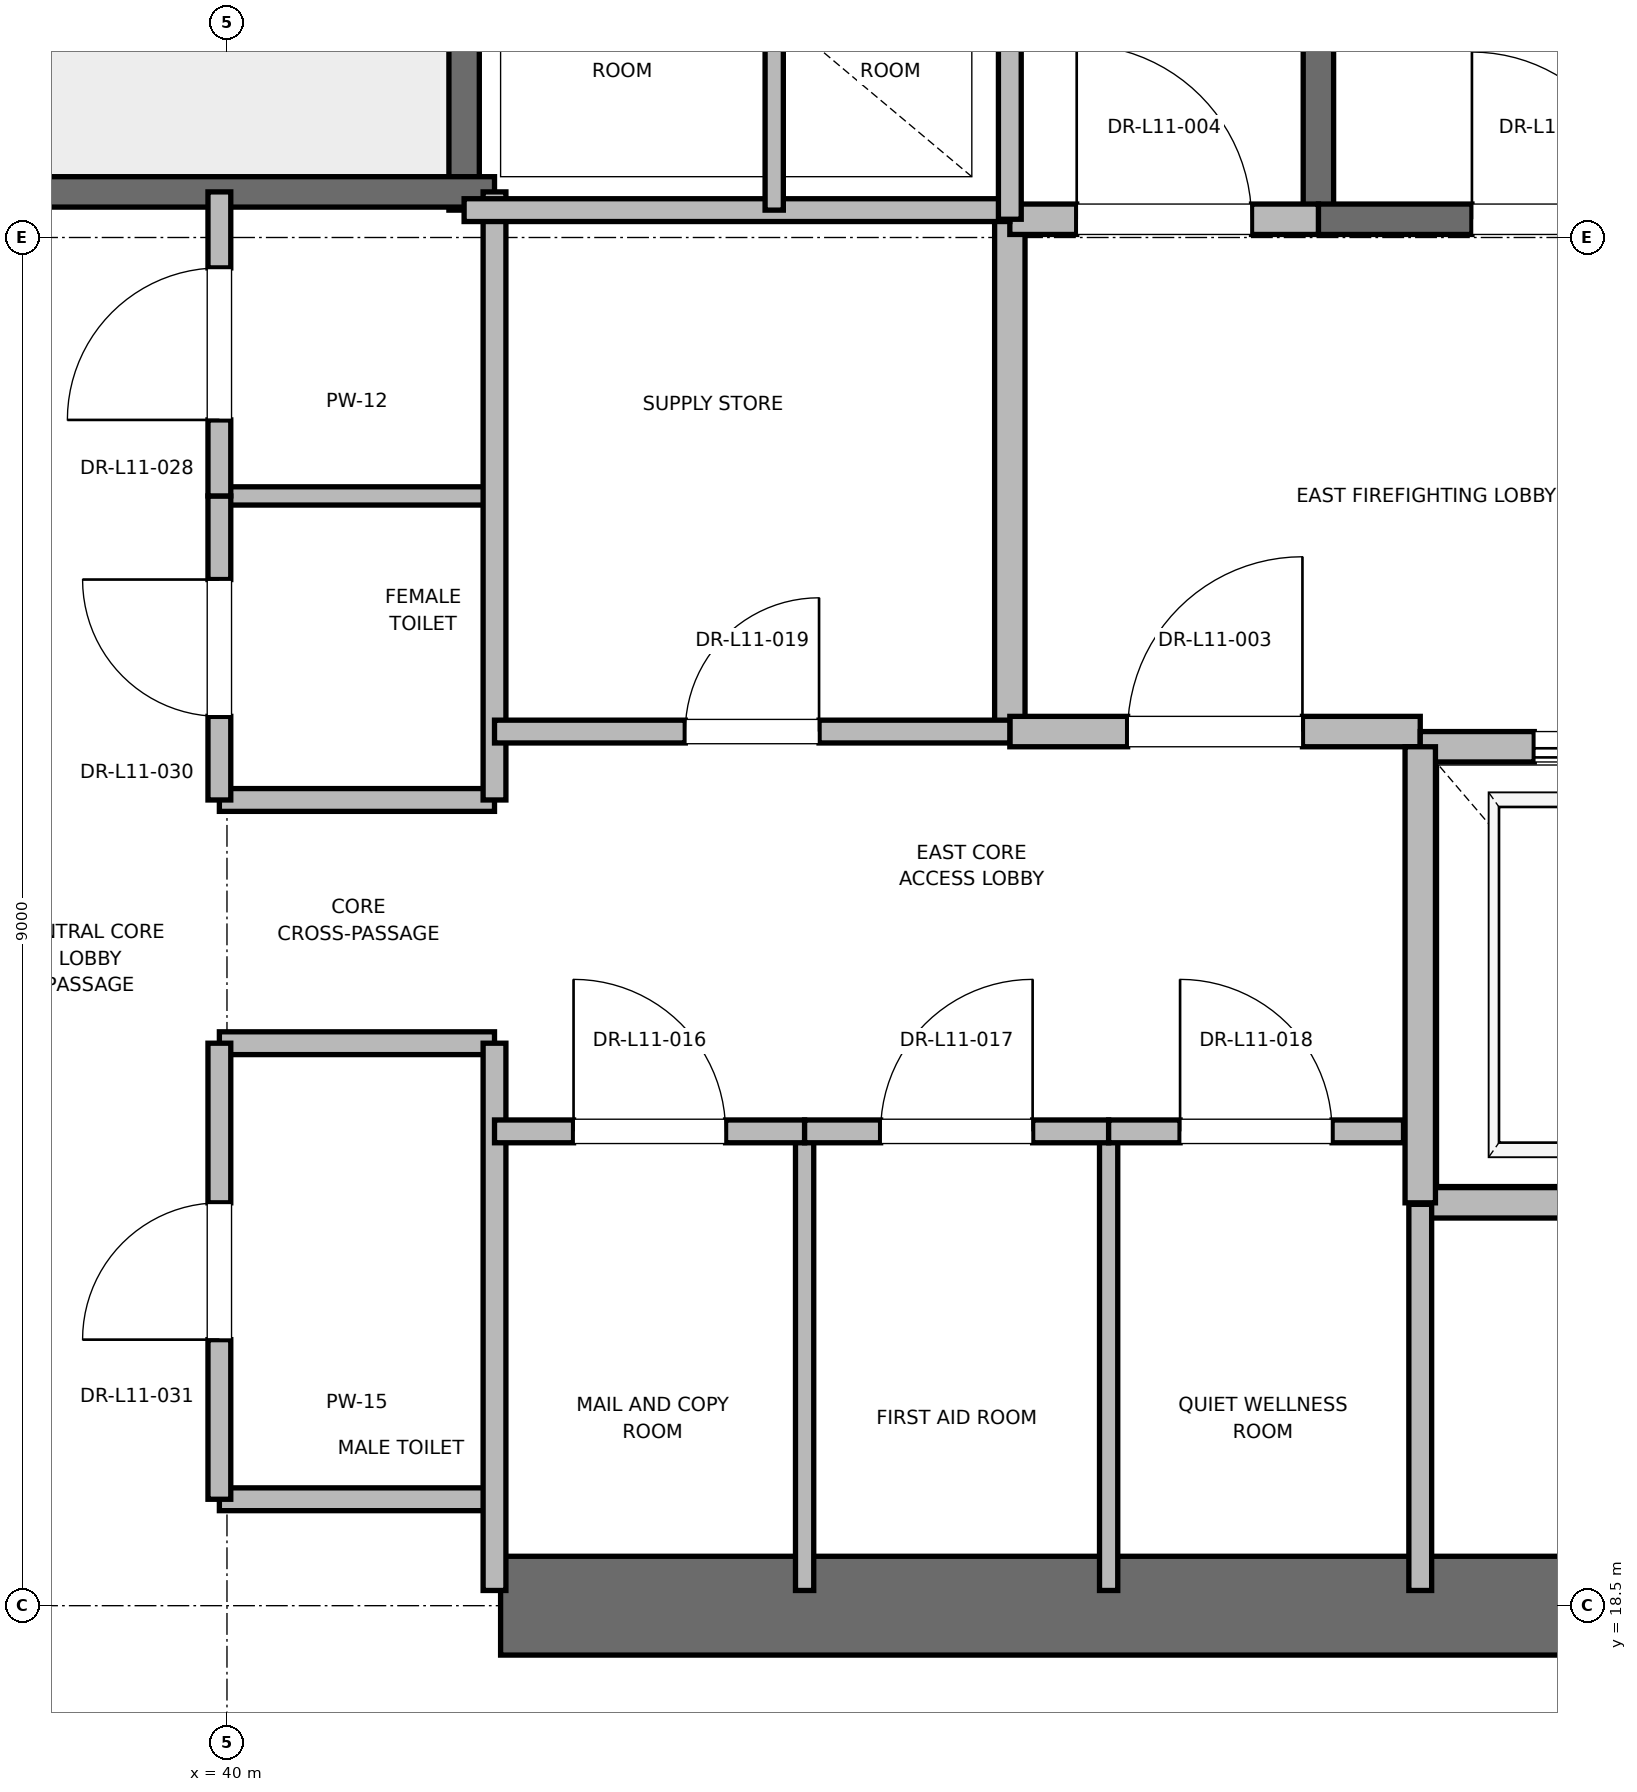
"""IFC4 building model, lengths in metres.
Left out: names, types, materials, properties, quantities, classifications, styles, units other than length and angle.
Written with IfcOpenShell. Run it as: python <this file> out.ifc"""

import sys

from ifc_helpers import new_model, si_unit, direction, frame, frame_2d, origin, place, context, subcontext, project, spatial, rectangle, extrude, element, fill, save


model = new_model("IFC4")
c1 = context("Model", 3, precision=1e-05, world=origin(), true_north=direction((0.0, 1.0)))
c2 = subcontext(c1, "Body", "Model", "MODEL_VIEW")
j1 = project(units=[si_unit("LENGTHUNIT", "METRE"), si_unit("PLANEANGLEUNIT", "RADIAN")], contexts=[c1])
p1 = place(None, origin())
s1 = spatial("IfcSite", under=j1, at=p1, CompositionType="ELEMENT")
p2 = place(p1, origin())
s2 = spatial("IfcBuilding", under=s1, at=p2, CompositionType="ELEMENT")
p3 = place(p2, frame((0.0, 0.0, 51.6)))
s3 = spatial("IfcBuildingStorey", under=s2, at=p3, CompositionType="ELEMENT", Elevation=51.6)
p4 = place(p3, frame((41.8, 18.5, 0.0), z_axis=(0.0, 0.0, 1.0), x_axis=(1.0, 0.0, 0.0)))
e1 = element("IfcWall", 1, at=p4, inside=s3, PredefinedType="SHEAR", context=c2, shape_type="SweptSolid", body=[
    extrude(rectangle(XDim=9.2, YDim=0.65, at=frame_2d((4.6, 0.0))), origin(), (0.0, 0.0, 1.0), 3.76),
])
p5 = place(p3, frame((47.18, 27.62, 0.0), z_axis=(0.0, 0.0, 1.0), x_axis=(0.0, 1.0, 0.0)))
e2 = element("IfcWall", 2, at=p5, inside=s3, PredefinedType="SOLIDWALL", context=c2, shape_type="SweptSolid", body=[
    extrude(rectangle(XDim=8.18, YDim=0.2, at=frame_2d((4.09, 0.0))), origin(), (0.0, 0.0, 1.0), 3.76),
])
p6 = place(p3, frame((47.18, 27.62, 0.0), z_axis=(0.0, 0.0, 1.0), x_axis=(1.0, 0.0, 0.0)))
e3 = element("IfcWall", 3, at=p6, inside=s3, PredefinedType="SOLIDWALL", context=c2, shape_type="SweptSolid", body=[
    extrude(rectangle(XDim=3.12, YDim=0.2, at=frame_2d((1.56, 0.0))), origin(), (0.0, 0.0, 1.0), 3.76),
])
p7 = place(p6, frame((1.01, 0.0, 0.0)))
e4 = element("IfcOpeningElement", 4, at=p7, cuts=e3, PredefinedType="OPENING", context=c2, shape_type="SweptSolid", body=[
    extrude(rectangle(XDim=1.1, YDim=2.15, at=frame_2d((0.55, 1.075))), frame((0.0, 0.1, 0.0), z_axis=(0.0, -1.0, 0.0), x_axis=(1.0, 0.0, 0.0)), (0.0, 0.0, 1.0), 0.2),
])
p8 = place(p3, frame((41.56, 27.68, 0.0), z_axis=(0.0, 0.0, 1.0), x_axis=(0.0, 1.0, 0.0)))
e5 = element("IfcWall", 5, at=p8, inside=s3, PredefinedType="SOLIDWALL", context=c2, shape_type="SweptSolid", body=[
    extrude(rectangle(XDim=8.57, YDim=0.2, at=frame_2d((4.285, 0.0))), origin(), (0.0, 0.0, 1.0), 3.76),
])
p9 = place(p3, frame((38.44, 27.8, 0.0), z_axis=(0.0, 0.0, 1.0), x_axis=(1.0, 0.0, 0.0)))
e6 = element("IfcWall", 6, at=p9, inside=s3, PredefinedType="SOLIDWALL", context=c2, shape_type="SweptSolid", body=[
    extrude(rectangle(XDim=3.32, YDim=0.2, at=frame_2d((1.66, 0.0))), origin(), (0.0, 0.0, 1.0), 3.76),
])
p10 = place(p3, frame((45.15, 24.25, 0.0), z_axis=(0.0, 0.0, 1.0), x_axis=(0.0, 1.0, 0.0)))
e7 = element("IfcWall", 7, at=p10, inside=s3, PredefinedType="PARTITIONING", context=c2, shape_type="SweptSolid", body=[
    extrude(rectangle(XDim=3.37, YDim=0.2, at=frame_2d((1.685, 0.0))), origin(), (0.0, 0.0, 1.0), 3.76),
])
p11 = place(p3, frame((45.15, 24.25, 0.0), z_axis=(0.0, 0.0, 1.0), x_axis=(1.0, 0.0, 0.0)))
e8 = element("IfcWall", 8, at=p11, inside=s3, PredefinedType="PARTITIONING", context=c2, shape_type="SweptSolid", body=[
    extrude(rectangle(XDim=2.7, YDim=0.2, at=frame_2d((1.35, 0.0))), origin(), (0.0, 0.0, 1.0), 3.76),
])
p12 = place(p11, frame((0.775, 0.0, 0.0)))
e9 = element("IfcOpeningElement", 9, at=p12, cuts=e8, PredefinedType="OPENING", context=c2, shape_type="SweptSolid", body=[
    extrude(rectangle(XDim=1.15, YDim=2.2, at=frame_2d((0.575, 1.1))), frame((0.0, 0.1, 0.0), z_axis=(0.0, -1.0, 0.0), x_axis=(1.0, 0.0, 0.0)), (0.0, 0.0, 1.0), 0.2),
])
p13 = place(p3, frame((45.15, 27.62, 0.0), z_axis=(0.0, 0.0, 1.0), x_axis=(1.0, 0.0, 0.0)))
e10 = element("IfcWall", 10, at=p13, inside=s3, PredefinedType="PARTITIONING", context=c2, shape_type="SweptSolid", body=[
    extrude(rectangle(XDim=2.03, YDim=0.2, at=frame_2d((1.015, 0.0))), origin(), (0.0, 0.0, 1.0), 3.76),
])
p14 = place(p13, frame((0.44, 0.0, 0.0)))
e11 = element("IfcOpeningElement", 11, at=p14, cuts=e10, PredefinedType="OPENING", context=c2, shape_type="SweptSolid", body=[
    extrude(rectangle(XDim=1.15, YDim=2.2, at=frame_2d((0.575, 1.1))), frame((0.0, 0.1, 0.0), z_axis=(0.0, -1.0, 0.0), x_axis=(1.0, 0.0, 0.0)), (0.0, 0.0, 1.0), 0.2),
])
p15 = place(p3, frame((47.85, 21.15, 0.0), z_axis=(0.0, 0.0, 1.0), x_axis=(1.0, 0.0, 0.0)))
e12 = element("IfcWall", 12, at=p15, inside=s3, PredefinedType="SOLIDWALL", context=c2, shape_type="SweptSolid", body=[
    extrude(rectangle(XDim=2.6, YDim=0.2, at=frame_2d((1.3, 0.0))), origin(), (0.0, 0.0, 1.0), 3.76),
])
p16 = place(p3, frame((50.45, 24.15, 0.0), z_axis=(0.0, 0.0, 1.0), x_axis=(-1.0, 0.0, 0.0)))
e13 = element("IfcWall", 13, at=p16, inside=s3, PredefinedType="SOLIDWALL", context=c2, shape_type="SweptSolid", body=[
    extrude(rectangle(XDim=2.6, YDim=0.2, at=frame_2d((1.3, 0.0))), origin(), (0.0, 0.0, 1.0), 2.54),
])
p17 = place(p16, frame((0.75, 0.0, 0.0)))
e14 = element("IfcOpeningElement", 14, at=p17, cuts=e13, PredefinedType="OPENING", context=c2, shape_type="SweptSolid", body=[
    extrude(rectangle(XDim=1.1, YDim=2.2, at=frame_2d((0.55, 1.1))), frame((0.0, 0.1, 0.0), z_axis=(0.0, -1.0, 0.0), x_axis=(1.0, 0.0, 0.0)), (0.0, 0.0, 1.0), 0.2),
])
p18 = place(p3, frame((47.85, 24.15, 0.0), z_axis=(0.0, 0.0, 1.0), x_axis=(0.0, -1.0, 0.0)))
e15 = element("IfcWall", 15, at=p18, inside=s3, PredefinedType="SOLIDWALL", context=c2, shape_type="SweptSolid", body=[
    extrude(rectangle(XDim=3.0, YDim=0.2, at=frame_2d((1.5, 0.0))), origin(), (0.0, 0.0, 1.0), 3.76),
])
for number, where, z_axis, x_axis in (
    (16, (39.95, 19.2, 0.0), (0.0, 0.0, 1.0), (1.0, 0.0, 0.0)),
    (17, (39.95, 22.2, 0.0), (0.0, 0.0, 1.0), (1.0, 0.0, 0.0)),
    (18, (39.95, 23.8, 0.0), (0.0, 0.0, 1.0), (1.0, 0.0, 0.0)),
):
    element("IfcWall", number, at=place(p3, frame(where, z_axis=z_axis, x_axis=x_axis)), inside=s3, PredefinedType="PARTITIONING", context=c2, shape_type="SweptSolid", body=[
        extrude(rectangle(XDim=1.81, YDim=0.15, at=frame_2d((0.905, 0.0))), origin(), (0.0, 0.0, 1.0), 2.85),
    ])
p19 = place(p3, frame((39.95, 25.8, 0.0), z_axis=(0.0, 0.0, 1.0), x_axis=(1.0, 0.0, 0.0)))
e19 = element("IfcWall", 19, at=p19, inside=s3, PredefinedType="PARTITIONING", context=c2, shape_type="SweptSolid", body=[
    extrude(rectangle(XDim=1.81, YDim=0.12, at=frame_2d((0.905, 0.0))), origin(), (0.0, 0.0, 1.0), 2.85),
])
p20 = place(p3, frame((41.76, 18.6, 0.0), z_axis=(0.0, 0.0, 1.0), x_axis=(0.0, 1.0, 0.0)))
e20 = element("IfcWall", 20, at=p20, inside=s3, PredefinedType="PARTITIONING", context=c2, shape_type="SweptSolid", body=[
    extrude(rectangle(XDim=3.6, YDim=0.15, at=frame_2d((1.8, 0.0))), origin(), (0.0, 0.0, 1.0), 2.54),
])
p21 = place(p3, frame((41.76, 23.8, 0.0), z_axis=(0.0, 0.0, 1.0), x_axis=(0.0, 1.0, 0.0)))
e21 = element("IfcWall", 21, at=p21, inside=s3, PredefinedType="PARTITIONING", context=c2, shape_type="SweptSolid", body=[
    extrude(rectangle(XDim=4.0, YDim=0.15, at=frame_2d((2.0, 0.0))), origin(), (0.0, 0.0, 1.0), 2.85),
])
p22 = place(p3, frame((39.95, 19.2, 0.0), z_axis=(0.0, 0.0, 1.0), x_axis=(0.0, 1.0, 0.0)))
e22 = element("IfcWall", 22, at=p22, inside=s3, PredefinedType="PARTITIONING", context=c2, shape_type="SweptSolid", body=[
    extrude(rectangle(XDim=3.0, YDim=0.15, at=frame_2d((1.5, 0.0))), origin(), (0.0, 0.0, 1.0), 2.85),
])
p23 = place(p22, frame((1.05, 0.0, 0.0)))
e23 = element("IfcOpeningElement", 23, at=p23, cuts=e22, PredefinedType="OPENING", context=c2, shape_type="SweptSolid", body=[
    extrude(rectangle(XDim=0.9, YDim=2.1, at=frame_2d((0.45, 1.05))), frame((0.0, 0.075, 0.0), z_axis=(0.0, -1.0, 0.0), x_axis=(1.0, 0.0, 0.0)), (0.0, 0.0, 1.0), 0.15),
])
p24 = place(p3, frame((39.95, 23.8, 0.0), z_axis=(0.0, 0.0, 1.0), x_axis=(0.0, 1.0, 0.0)))
e24 = element("IfcWall", 24, at=p24, inside=s3, PredefinedType="PARTITIONING", context=c2, shape_type="SweptSolid", body=[
    extrude(rectangle(XDim=2.0, YDim=0.15, at=frame_2d((1.0, 0.0))), origin(), (0.0, 0.0, 1.0), 2.85),
])
p25 = place(p24, frame((0.55, 0.0, 0.0)))
e25 = element("IfcOpeningElement", 25, at=p25, cuts=e24, PredefinedType="OPENING", context=c2, shape_type="SweptSolid", body=[
    extrude(rectangle(XDim=0.9, YDim=2.1, at=frame_2d((0.45, 1.05))), frame((0.0, 0.075, 0.0), z_axis=(0.0, -1.0, 0.0), x_axis=(1.0, 0.0, 0.0)), (0.0, 0.0, 1.0), 0.15),
])
p26 = place(p3, frame((39.95, 25.8, 0.0), z_axis=(0.0, 0.0, 1.0), x_axis=(0.0, 1.0, 0.0)))
e26 = element("IfcWall", 26, at=p26, inside=s3, PredefinedType="PARTITIONING", context=c2, shape_type="SweptSolid", body=[
    extrude(rectangle(XDim=2.0, YDim=0.15, at=frame_2d((1.0, 0.0))), origin(), (0.0, 0.0, 1.0), 2.85),
])
p27 = place(p26, frame((0.5, 0.0, 0.0)))
e27 = element("IfcOpeningElement", 27, at=p27, cuts=e26, PredefinedType="OPENING", context=c2, shape_type="SweptSolid", body=[
    extrude(rectangle(XDim=1.0, YDim=2.15, at=frame_2d((0.5, 1.075))), frame((0.0, 0.075, 0.0), z_axis=(0.0, -1.0, 0.0), x_axis=(1.0, 0.0, 0.0)), (0.0, 0.0, 1.0), 0.15),
])
p28 = place(p3, frame((41.56, 27.68, 0.0), z_axis=(0.0, 0.0, 1.0), x_axis=(1.0, 0.0, 0.0)))
e28 = element("IfcWall", 28, at=p28, inside=s3, PredefinedType="PARTITIONING", context=c2, shape_type="SweptSolid", body=[
    extrude(rectangle(XDim=3.59, YDim=0.15, at=frame_2d((1.795, 0.0))), origin(), (0.0, 0.0, 1.0), 2.85),
])
p29 = place(p3, frame((47.85, 18.6, 0.0), z_axis=(0.0, 0.0, 1.0), x_axis=(0.0, 1.0, 0.0)))
e29 = element("IfcWall", 29, at=p29, inside=s3, PredefinedType="PARTITIONING", context=c2, shape_type="SweptSolid", body=[
    extrude(rectangle(XDim=2.54, YDim=0.15, at=frame_2d((1.27, 0.0))), origin(), (0.0, 0.0, 1.0), 2.85),
])
for number, where, z_axis, x_axis in (
    (30, (43.8, 18.6, 0.0), (0.0, 0.0, 1.0), (0.0, 1.0, 0.0)),
    (31, (45.8, 18.6, 0.0), (0.0, 0.0, 1.0), (0.0, 1.0, 0.0)),
):
    element("IfcWall", number, at=place(p3, frame(where, z_axis=z_axis, x_axis=x_axis)), inside=s3, PredefinedType="PARTITIONING", context=c2, shape_type="SweptSolid", body=[
        extrude(rectangle(XDim=3.02, YDim=0.12, at=frame_2d((1.51, 0.0))), origin(), (0.0, 0.0, 1.0), 2.85),
    ])
p30 = place(p3, frame((41.76, 21.62, 0.0), z_axis=(0.0, 0.0, 1.0), x_axis=(1.0, 0.0, 0.0)))
e32 = element("IfcWall", 32, at=p30, inside=s3, PredefinedType="PARTITIONING", context=c2, shape_type="SweptSolid", body=[
    extrude(rectangle(XDim=2.04, YDim=0.15, at=frame_2d((1.02, 0.0))), origin(), (0.0, 0.0, 1.0), 2.85),
])
p31 = place(p30, frame((0.52, 0.0, 0.0)))
e33 = element("IfcOpeningElement", 33, at=p31, cuts=e32, PredefinedType="OPENING", context=c2, shape_type="SweptSolid", body=[
    extrude(rectangle(XDim=1.0, YDim=2.15, at=frame_2d((0.5, 1.075))), frame((0.0, 0.075, 0.0), z_axis=(0.0, -1.0, 0.0), x_axis=(1.0, 0.0, 0.0)), (0.0, 0.0, 1.0), 0.15),
])
p32 = place(p3, frame((43.8, 21.62, 0.0), z_axis=(0.0, 0.0, 1.0), x_axis=(1.0, 0.0, 0.0)))
e34 = element("IfcWall", 34, at=p32, inside=s3, PredefinedType="PARTITIONING", context=c2, shape_type="SweptSolid", body=[
    extrude(rectangle(XDim=2.0, YDim=0.15, at=frame_2d((1.0, 0.0))), origin(), (0.0, 0.0, 1.0), 2.85),
])
p33 = place(p32, frame((0.5, 0.0, 0.0)))
e35 = element("IfcOpeningElement", 35, at=p33, cuts=e34, PredefinedType="OPENING", context=c2, shape_type="SweptSolid", body=[
    extrude(rectangle(XDim=1.0, YDim=2.15, at=frame_2d((0.5, 1.075))), frame((0.0, 0.075, 0.0), z_axis=(0.0, -1.0, 0.0), x_axis=(1.0, 0.0, 0.0)), (0.0, 0.0, 1.0), 0.15),
])
p34 = place(p3, frame((45.8, 21.62, 0.0), z_axis=(0.0, 0.0, 1.0), x_axis=(1.0, 0.0, 0.0)))
e36 = element("IfcWall", 36, at=p34, inside=s3, PredefinedType="PARTITIONING", context=c2, shape_type="SweptSolid", body=[
    extrude(rectangle(XDim=1.94, YDim=0.15, at=frame_2d((0.97, 0.0))), origin(), (0.0, 0.0, 1.0), 2.85),
])
p35 = place(p34, frame((0.47, 0.0, 0.0)))
e37 = element("IfcOpeningElement", 37, at=p35, cuts=e36, PredefinedType="OPENING", context=c2, shape_type="SweptSolid", body=[
    extrude(rectangle(XDim=1.0, YDim=2.15, at=frame_2d((0.5, 1.075))), frame((0.0, 0.075, 0.0), z_axis=(0.0, -1.0, 0.0), x_axis=(1.0, 0.0, 0.0)), (0.0, 0.0, 1.0), 0.15),
])
p36 = place(p3, frame((41.76, 24.25, 0.0), z_axis=(0.0, 0.0, 1.0), x_axis=(1.0, 0.0, 0.0)))
e38 = element("IfcWall", 38, at=p36, inside=s3, PredefinedType="PARTITIONING", context=c2, shape_type="SweptSolid", body=[
    extrude(rectangle(XDim=3.39, YDim=0.15, at=frame_2d((1.695, 0.0))), origin(), (0.0, 0.0, 1.0), 2.85),
])
p37 = place(p36, frame((1.255, 0.0, 0.0)))
e39 = element("IfcOpeningElement", 39, at=p37, cuts=e38, PredefinedType="OPENING", context=c2, shape_type="SweptSolid", body=[
    extrude(rectangle(XDim=0.88, YDim=2.1, at=frame_2d((0.44, 1.05))), frame((0.0, 0.075, 0.0), z_axis=(0.0, -1.0, 0.0), x_axis=(1.0, 0.0, 0.0)), (0.0, 0.0, 1.0), 0.15),
])
p38 = place(p3, frame((45.15, 27.62, 0.0), z_axis=(0.0, 0.0, 1.0), x_axis=(0.0, 1.0, 0.0)))
e40 = element("IfcWall", 40, at=p38, inside=s3, PredefinedType="PARTITIONING", context=c2, shape_type="SweptSolid", body=[
    extrude(rectangle(XDim=3.1, YDim=0.15, at=frame_2d((1.55, 0.0))), origin(), (0.0, 0.0, 1.0), 2.85),
])
p39 = place(p3, frame((43.6, 27.68, 0.0), z_axis=(0.0, 0.0, 1.0), x_axis=(0.0, 1.0, 0.0)))
e41 = element("IfcWall", 41, at=p39, inside=s3, PredefinedType="PARTITIONING", context=c2, shape_type="SweptSolid", body=[
    extrude(rectangle(XDim=3.04, YDim=0.12, at=frame_2d((1.52, 0.0))), origin(), (0.0, 0.0, 1.0), 2.85),
])
p40 = place(p7, origin())
e42 = element("IfcDoor", 42, at=p40, inside=s3, OperationType="SINGLE_SWING_LEFT", PredefinedType="DOOR", context=c2, shape_type="SweptSolid", body=[
    extrude(rectangle(XDim=1.1, YDim=2.15, at=frame_2d((0.55, 1.075))), frame((0.0, 0.025, 0.0), z_axis=(0.0, -1.0, 0.0), x_axis=(1.0, 0.0, 0.0)), (0.0, 0.0, 1.0), 0.05),
])
fill(e4, e42)
p41 = place(p12, origin())
e43 = element("IfcDoor", 43, at=p41, inside=s3, OperationType="SINGLE_SWING_RIGHT", PredefinedType="DOOR", context=c2, shape_type="SweptSolid", body=[
    extrude(rectangle(XDim=1.15, YDim=2.2, at=frame_2d((0.575, 1.1))), frame((0.0, 0.025, 0.0), z_axis=(0.0, -1.0, 0.0), x_axis=(1.0, 0.0, 0.0)), (0.0, 0.0, 1.0), 0.05),
])
fill(e9, e43)
p42 = place(p14, origin())
e44 = element("IfcDoor", 44, at=p42, inside=s3, OperationType="SINGLE_SWING_LEFT", PredefinedType="DOOR", context=c2, shape_type="SweptSolid", body=[
    extrude(rectangle(XDim=1.15, YDim=2.2, at=frame_2d((0.575, 1.1))), frame((0.0, 0.025, 0.0), z_axis=(0.0, -1.0, 0.0), x_axis=(1.0, 0.0, 0.0)), (0.0, 0.0, 1.0), 0.05),
])
fill(e11, e44)
p43 = place(p17, origin())
e45 = element("IfcDoor", 45, at=p43, inside=s3, OperationType="SLIDING_TO_RIGHT", PredefinedType="DOOR", context=c2, shape_type="SweptSolid", body=[
    extrude(rectangle(XDim=1.1, YDim=2.2, at=frame_2d((0.55, 1.1))), frame((0.0, 0.025, 0.0), z_axis=(0.0, -1.0, 0.0), x_axis=(1.0, 0.0, 0.0)), (0.0, 0.0, 1.0), 0.05),
])
fill(e14, e45)
p44 = place(p23, origin())
e46 = element("IfcDoor", 46, at=p44, inside=s3, OperationType="SINGLE_SWING_LEFT", PredefinedType="DOOR", context=c2, shape_type="SweptSolid", body=[
    extrude(rectangle(XDim=0.9, YDim=2.1, at=frame_2d((0.45, 1.05))), frame((0.0, 0.025, 0.0), z_axis=(0.0, -1.0, 0.0), x_axis=(1.0, 0.0, 0.0)), (0.0, 0.0, 1.0), 0.05),
])
fill(e23, e46)
p45 = place(p25, origin())
e47 = element("IfcDoor", 47, at=p45, inside=s3, OperationType="SINGLE_SWING_RIGHT", PredefinedType="DOOR", context=c2, shape_type="SweptSolid", body=[
    extrude(rectangle(XDim=0.9, YDim=2.1, at=frame_2d((0.45, 1.05))), frame((0.0, 0.025, 0.0), z_axis=(0.0, -1.0, 0.0), x_axis=(1.0, 0.0, 0.0)), (0.0, 0.0, 1.0), 0.05),
])
fill(e25, e47)
p46 = place(p27, origin())
e48 = element("IfcDoor", 48, at=p46, inside=s3, OperationType="SINGLE_SWING_LEFT", PredefinedType="DOOR", context=c2, shape_type="SweptSolid", body=[
    extrude(rectangle(XDim=1.0, YDim=2.15, at=frame_2d((0.5, 1.075))), frame((0.0, 0.025, 0.0), z_axis=(0.0, -1.0, 0.0), x_axis=(1.0, 0.0, 0.0)), (0.0, 0.0, 1.0), 0.05),
])
fill(e27, e48)
p47 = place(p31, origin())
e49 = element("IfcDoor", 49, at=p47, inside=s3, OperationType="SINGLE_SWING_LEFT", PredefinedType="DOOR", context=c2, shape_type="SweptSolid", body=[
    extrude(rectangle(XDim=1.0, YDim=2.15, at=frame_2d((0.5, 1.075))), frame((0.0, 0.025, 0.0), z_axis=(0.0, -1.0, 0.0), x_axis=(1.0, 0.0, 0.0)), (0.0, 0.0, 1.0), 0.05),
])
fill(e33, e49)
p48 = place(p33, origin())
e50 = element("IfcDoor", 50, at=p48, inside=s3, OperationType="SINGLE_SWING_RIGHT", PredefinedType="DOOR", context=c2, shape_type="SweptSolid", body=[
    extrude(rectangle(XDim=1.0, YDim=2.15, at=frame_2d((0.5, 1.075))), frame((0.0, 0.025, 0.0), z_axis=(0.0, -1.0, 0.0), x_axis=(1.0, 0.0, 0.0)), (0.0, 0.0, 1.0), 0.05),
])
fill(e35, e50)
p49 = place(p35, origin())
e51 = element("IfcDoor", 51, at=p49, inside=s3, OperationType="SINGLE_SWING_LEFT", PredefinedType="DOOR", context=c2, shape_type="SweptSolid", body=[
    extrude(rectangle(XDim=1.0, YDim=2.15, at=frame_2d((0.5, 1.075))), frame((0.0, 0.025, 0.0), z_axis=(0.0, -1.0, 0.0), x_axis=(1.0, 0.0, 0.0)), (0.0, 0.0, 1.0), 0.05),
])
fill(e37, e51)
p50 = place(p37, origin())
e52 = element("IfcDoor", 52, at=p50, inside=s3, OperationType="SINGLE_SWING_RIGHT", PredefinedType="DOOR", context=c2, shape_type="SweptSolid", body=[
    extrude(rectangle(XDim=0.88, YDim=2.1, at=frame_2d((0.44, 1.05))), frame((0.0, 0.025, 0.0), z_axis=(0.0, -1.0, 0.0), x_axis=(1.0, 0.0, 0.0)), (0.0, 0.0, 1.0), 0.05),
])
fill(e39, e52)
save(model, sys.argv[1])
